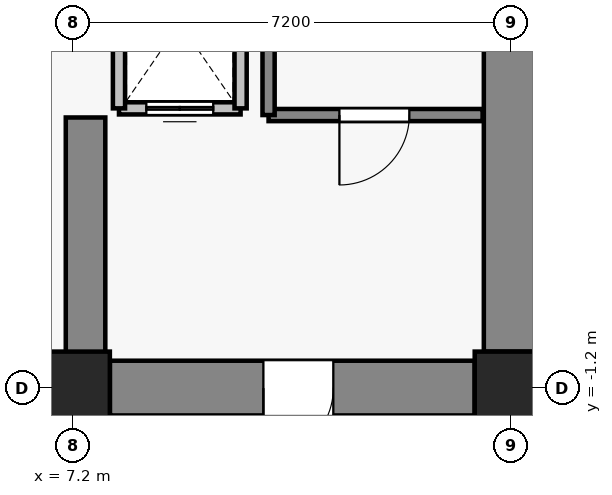
"""IFC4 building model, lengths in metres.
Left out: names, types, materials, properties, quantities, classifications, styles, units other than length and angle.
Written with IfcOpenShell. Run it as: python <this file> out.ifc"""

import sys

from ifc_helpers import new_model, si_unit, direction, frame, frame_2d, origin, origin_2d, place, context, subcontext, project, spatial, rectangle, extrude, source, transform, mapped, element, fill, save


model = new_model("IFC4")
c1 = context("Model", 3, precision=1e-05, world=origin(), true_north=direction((0.0, 1.0)))
c2 = subcontext(c1, "Body", "Model", "MODEL_VIEW")
j1 = project(units=[si_unit("LENGTHUNIT", "METRE"), si_unit("PLANEANGLEUNIT", "RADIAN")], contexts=[c1])
p1 = place(None, origin())
s1 = spatial("IfcSite", under=j1, at=p1, CompositionType="ELEMENT")
p2 = place(p1, origin())
s2 = spatial("IfcBuilding", under=s1, at=p2, CompositionType="ELEMENT")
p3 = place(p2, frame((0.0, 0.0, 50.5)))
s3 = spatial("IfcBuildingStorey", under=s2, at=p3, CompositionType="ELEMENT", Elevation=50.5)
for number, where, z_axis, x_axis in (
    (1, (7.2, -1.2, 0.0), (0.0, 0.0, 1.0), (1.0, 0.0, 0.0)),
    (2, (14.4, -1.2, 0.0), (0.0, 0.0, 1.0), (1.0, 0.0, 0.0)),
):
    element("IfcColumn", number, at=place(p3, frame(where, z_axis=z_axis, x_axis=x_axis)), inside=s3, PredefinedType="COLUMN", context=c2, shape_type="SweptSolid", body=[
        extrude(rectangle(XDim=1.2, YDim=1.2, at=origin_2d()), origin(), (0.0, 0.0, 1.0), 3.3),
    ])
p4 = place(p3, frame((14.4, -0.6, 0.0), z_axis=(0.0, 0.0, 1.0), x_axis=(0.0, 1.0, 0.0)))
e3 = element("IfcWall", 3, at=p4, inside=s3, PredefinedType="SHEAR", context=c2, shape_type="SweptSolid", body=[
    extrude(rectangle(XDim=6.6, YDim=0.9, at=frame_2d((3.3, 0.0))), origin(), (0.0, 0.0, 1.0), 3.075),
])
p5 = place(p3, frame((13.8, -1.2, 0.0), z_axis=(0.0, 0.0, 1.0), x_axis=(-1.0, 0.0, 0.0)))
e4 = element("IfcWall", 4, at=p5, inside=s3, PredefinedType="SHEAR", context=c2, shape_type="SweptSolid", body=[
    extrude(rectangle(XDim=6.0, YDim=0.9, at=frame_2d((3.0, 0.0))), origin(), (0.0, 0.0, 1.0), 3.075),
])
p6 = place(p5, frame((2.325, 0.0, 0.0)))
e5 = element("IfcOpeningElement", 5, at=p6, cuts=e4, PredefinedType="OPENING", context=c2, shape_type="SweptSolid", body=[
    extrude(rectangle(XDim=1.15, YDim=2.15, at=frame_2d((0.575, 1.075))), frame((0.0, 0.46, 0.0), z_axis=(0.0, -1.0, 0.0), x_axis=(1.0, 0.0, 0.0)), (0.0, 0.0, 1.0), 0.92),
])
p7 = place(p3, frame((7.4, -0.75, 0.0), z_axis=(0.0, 0.0, 1.0), x_axis=(0.0, 1.0, 0.0)))
e6 = element("IfcWall", 6, at=p7, inside=s3, PredefinedType="SHEAR", context=c2, shape_type="SweptSolid", body=[
    extrude(rectangle(XDim=4.0, YDim=0.65, at=frame_2d((2.0, 0.0))), origin(), (0.0, 0.0, 1.0), 3.075),
])
p8 = place(p3, frame((9.95, 3.4, 0.0), z_axis=(0.0, 0.0, 1.0), x_axis=(-1.0, 0.0, 0.0)))
e7 = element("IfcWall", 7, at=p8, inside=s3, PredefinedType="SOLIDWALL", context=c2, shape_type="SweptSolid", body=[
    extrude(rectangle(XDim=2.0, YDim=0.2, at=frame_2d((1.0, 0.0))), origin(), (0.0, 0.0, 1.0), 3.075),
])
p9 = place(p8, frame((0.45, 0.0, 0.0)))
e8 = element("IfcOpeningElement", 8, at=p9, cuts=e7, PredefinedType="OPENING", context=c2, shape_type="SweptSolid", body=[
    extrude(rectangle(XDim=1.1, YDim=2.2, at=frame_2d((0.55, 1.1))), frame((0.0, 0.11, 0.0), z_axis=(0.0, -1.0, 0.0), x_axis=(1.0, 0.0, 0.0)), (0.0, 0.0, 1.0), 0.22),
])
for number, where, z_axis, x_axis in (
    (9, (7.95, 3.4, 0.0), (0.0, 0.0, 1.0), (0.0, 1.0, 0.0)),
    (10, (9.95, 6.2, 0.0), (0.0, 0.0, 1.0), (0.0, -1.0, 0.0)),
):
    element("IfcWall", number, at=place(p3, frame(where, z_axis=z_axis, x_axis=x_axis)), inside=s3, PredefinedType="SOLIDWALL", context=c2, shape_type="SweptSolid", body=[
        extrude(rectangle(XDim=2.8, YDim=0.2, at=frame_2d((1.4, 0.0))), origin(), (0.0, 0.0, 1.0), 3.075),
    ])
p10 = place(p3, frame((13.93, 3.29, 0.0), z_axis=(0.0, 0.0, 1.0), x_axis=(-1.0, 0.0, 0.0)))
e11 = element("IfcWall", 11, at=p10, inside=s3, PredefinedType="SOLIDWALL", context=c2, shape_type="SweptSolid", body=[
    extrude(rectangle(XDim=3.52, YDim=0.2, at=frame_2d((1.76, 0.0))), origin(), (0.0, 0.0, 1.0), 3.075),
])
p11 = place(p10, frame((1.205, 0.0, 0.0)))
e12 = element("IfcOpeningElement", 12, at=p11, cuts=e11, PredefinedType="OPENING", context=c2, shape_type="SweptSolid", body=[
    extrude(rectangle(XDim=1.15, YDim=2.15, at=frame_2d((0.575, 1.075))), frame((0.0, 0.11, 0.0), z_axis=(0.0, -1.0, 0.0), x_axis=(1.0, 0.0, 0.0)), (0.0, 0.0, 1.0), 0.22),
])
p12 = place(p3, frame((10.41, 3.29, 0.0), z_axis=(0.0, 0.0, 1.0), x_axis=(0.0, 1.0, 0.0)))
e13 = element("IfcWall", 13, at=p12, inside=s3, PredefinedType="SOLIDWALL", context=c2, shape_type="SweptSolid", body=[
    extrude(rectangle(XDim=8.84, YDim=0.2, at=frame_2d((4.42, 0.0))), origin(), (0.0, 0.0, 1.0), 3.075),
])
m1 = source(origin(), c2, "Body", "SweptSolid", [
    extrude(rectangle(XDim=1.1, YDim=2.2, at=frame_2d((0.55, 1.1))), frame((0.0, 0.025, 0.0), z_axis=(0.0, -1.0, 0.0), x_axis=(1.0, 0.0, 0.0)), (0.0, 0.0, 1.0), 0.05),
])
p13 = place(p9, origin())
e14 = element("IfcDoor", 14, at=p13, inside=s3, OperationType="DOUBLE_DOOR_SLIDING", PredefinedType="DOOR", context=c2, shape_type="MappedRepresentation", body=[
    mapped(m1, transform((0.0, 0.0, 0.0), x_axis=(1.0, 0.0, 0.0), y_axis=(0.0, 1.0, 0.0), z_axis=(0.0, 0.0, 1.0), scale=1.0)),
])
fill(e8, e14)
m2 = source(origin(), c2, "Body", "SweptSolid", [
    extrude(rectangle(XDim=1.15, YDim=2.15, at=frame_2d((0.575, 1.075))), frame((0.0, 0.025, 0.0), z_axis=(0.0, -1.0, 0.0), x_axis=(1.0, 0.0, 0.0)), (0.0, 0.0, 1.0), 0.05),
])
p14 = place(p11, origin())
e15 = element("IfcDoor", 15, at=p14, inside=s3, OperationType="SINGLE_SWING_RIGHT", PredefinedType="DOOR", context=c2, shape_type="MappedRepresentation", body=[
    mapped(m2, transform((0.0, 0.0, 0.0), x_axis=(1.0, 0.0, 0.0), y_axis=(0.0, 1.0, 0.0), z_axis=(0.0, 0.0, 1.0), scale=1.0)),
])
fill(e12, e15)
p15 = place(p6, origin())
e16 = element("IfcDoor", 16, at=p15, inside=s3, OperationType="SINGLE_SWING_RIGHT", PredefinedType="DOOR", context=c2, shape_type="MappedRepresentation", body=[
    mapped(m2, transform((0.0, 0.0, 0.0), x_axis=(1.0, 0.0, 0.0), y_axis=(0.0, 1.0, 0.0), z_axis=(0.0, 0.0, 1.0), scale=1.0)),
])
fill(e5, e16)
save(model, sys.argv[1])
